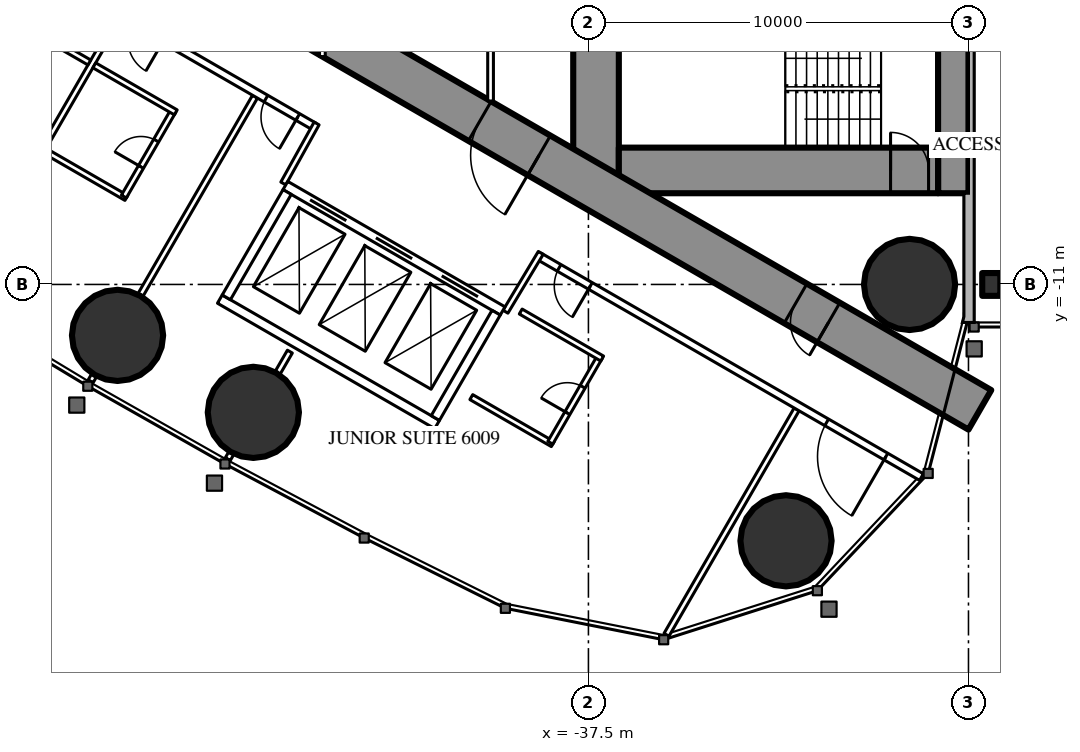
"""IFC4 building model, lengths in metres.
Left out: names, types, materials, properties, quantities, classifications, styles, units other than length and angle.
Written with IfcOpenShell. Run it as: python <this file> out.ifc"""

import sys

from ifc_helpers import new_model, si_unit, direction, frame, frame_2d, origin, origin_2d, place, context, subcontext, project, spatial, rectangle, circle, i_section, extrude, element, fill, save


model = new_model("IFC4")
c1 = context("Model", 3, precision=1e-05, world=origin(), true_north=direction((0.0, 1.0)))
c2 = subcontext(c1, "Body", "Model", "MODEL_VIEW")
j1 = project(units=[si_unit("LENGTHUNIT", "METRE"), si_unit("PLANEANGLEUNIT", "RADIAN")], contexts=[c1])
p1 = place(None, origin())
s1 = spatial("IfcSite", under=j1, at=p1, CompositionType="ELEMENT")
p2 = place(p1, origin())
s2 = spatial("IfcBuilding", under=s1, at=p2, CompositionType="ELEMENT")
p3 = place(p2, frame((0.0, 0.0, 226.1)))
s3 = spatial("IfcBuildingStorey", under=s2, at=p3, CompositionType="ELEMENT", Elevation=226.1)
for number, where, z_axis, x_axis in (
    (1, (-32.301, -17.745, 0.0), (0.0, 0.0, 1.0), (1.0, 0.0, 0.0)),
    (2, (-29.05, -11.0, 0.0), (0.0, 0.0, 1.0), (1.0, 0.0, 0.0)),
    (3, (-49.89, -12.34, 0.0), (0.0, 0.0, 1.0), (1.0, 0.0, 0.0)),
    (4, (-46.317, -14.365, 0.0), (0.0, 0.0, 1.0), (1.0, 0.0, 0.0)),
):
    element("IfcColumn", number, at=place(p3, frame(where, z_axis=z_axis, x_axis=x_axis)), inside=s3, PredefinedType="COLUMN", context=c2, shape_type="SweptSolid", body=[
        extrude(circle(Radius=1.2, at=origin_2d()), origin(), (0.0, 0.0, 1.0), 3.6),
    ])
p4 = place(p3, frame((-27.9, 8.6, 0.0), z_axis=(0.0, 0.0, 1.0), x_axis=(0.0, -1.0, 0.0)))
e5 = element("IfcWall", 5, at=p4, inside=s3, PredefinedType="SHEAR", context=c2, shape_type="SweptSolid", body=[
    extrude(rectangle(XDim=17.2, YDim=0.8, at=frame_2d((8.6, 0.0))), origin(), (0.0, 0.0, 1.0), 3.6),
])
p5 = place(p4, frame((6.95, 0.0, 0.0)))
e6 = element("IfcOpeningElement", 6, at=p5, cuts=e5, PredefinedType="OPENING", context=c2, shape_type="SweptSolid", body=[
    extrude(rectangle(XDim=0.9, YDim=2.2, at=frame_2d((0.45, 1.1))), frame((0.0, 0.41, 0.0), z_axis=(0.0, -1.0, 0.0), x_axis=(1.0, 0.0, 0.0)), (0.0, 0.0, 1.0), 0.82),
])
p6 = place(p3, frame((-37.3, 8.6, 0.0), z_axis=(0.0, 0.0, 1.0), x_axis=(0.0, -1.0, 0.0)))
e7 = element("IfcWall", 7, at=p6, inside=s3, PredefinedType="SHEAR", context=c2, shape_type="SweptSolid", body=[
    extrude(rectangle(XDim=17.2, YDim=1.2, at=frame_2d((8.6, 0.0))), origin(), (0.0, 0.0, 1.0), 3.6),
])
p7 = place(p6, frame((7.7, 0.0, 0.0)))
e8 = element("IfcOpeningElement", 8, at=p7, cuts=e7, PredefinedType="OPENING", context=c2, shape_type="SweptSolid", body=[
    extrude(rectangle(XDim=1.8, YDim=2.2, at=frame_2d((0.9, 1.1))), frame((0.0, 0.61, 0.0), z_axis=(0.0, -1.0, 0.0), x_axis=(1.0, 0.0, 0.0)), (0.0, 0.0, 1.0), 1.22),
])
p8 = place(p3, frame((-28.3, -8.0, 0.0), z_axis=(0.0, 0.0, 1.0), x_axis=(-1.0, 0.0, 0.0)))
e9 = element("IfcWall", 9, at=p8, inside=s3, PredefinedType="SHEAR", context=c2, shape_type="SweptSolid", body=[
    extrude(rectangle(XDim=8.4, YDim=1.2, at=frame_2d((4.2, 0.0))), origin(), (0.0, 0.0, 1.0), 3.6),
])
p9 = place(p8, frame((0.25, 0.0, 0.0)))
e10 = element("IfcOpeningElement", 10, at=p9, cuts=e9, PredefinedType="OPENING", context=c2, shape_type="SweptSolid", body=[
    extrude(rectangle(XDim=1.0, YDim=2.2, at=frame_2d((0.5, 1.1))), frame((0.0, 0.61, 0.0), z_axis=(0.0, -1.0, 0.0), x_axis=(1.0, 0.0, 0.0)), (0.0, 0.0, 1.0), 1.22),
])
p10 = place(p3, frame((-27.2, -14.3, 0.0), z_axis=(0.0, 0.0, 1.0), x_axis=(-0.866024021859, 0.500002393557, 0.0)))
e11 = element("IfcWall", 11, at=p10, inside=s3, PredefinedType="SHEAR", context=c2, shape_type="SweptSolid", body=[
    extrude(rectangle(XDim=27.907, YDim=1.2, at=frame_2d((13.954, 0.0))), origin(), (0.0, 0.0, 1.0), 3.6),
])
p11 = place(p10, frame((4.6, 0.0, 0.0)))
e12 = element("IfcOpeningElement", 12, at=p11, cuts=e11, PredefinedType="OPENING", context=c2, shape_type="SweptSolid", body=[
    extrude(rectangle(XDim=1.0, YDim=2.2, at=frame_2d((0.5, 1.1))), frame((0.0, 0.61, 0.0), z_axis=(0.0, -1.0, 0.0), x_axis=(1.0, 0.0, 0.0)), (0.0, 0.0, 1.0), 1.22),
])
p12 = place(p10, frame((13.395, 0.0, 0.0)))
e13 = element("IfcOpeningElement", 13, at=p12, cuts=e11, PredefinedType="OPENING", context=c2, shape_type="SweptSolid", body=[
    extrude(rectangle(XDim=1.8, YDim=2.2, at=frame_2d((0.9, 1.1))), frame((0.0, 0.61, 0.0), z_axis=(0.0, -1.0, 0.0), x_axis=(1.0, 0.0, 0.0)), (0.0, 0.0, 1.0), 1.22),
])
p13 = place(p3, frame((-26.9, -11.0, 0.0), z_axis=(0.0, 0.0, 1.0), x_axis=(1.0, 0.0, 0.0)))
e14 = element("IfcColumn", 14, at=p13, inside=s3, PredefinedType="COLUMN", context=c2, shape_type="SweptSolid", body=[
    extrude(i_section(OverallWidth=0.476, OverallDepth=0.6, WebThickness=0.1, FlangeThickness=0.14, FilletRadius=0.02, at=origin_2d()), origin(), (0.0, 0.0, 1.0), 3.6),
])
p14 = place(p3, frame((-32.022, -14.287, 0.0), z_axis=(0.0, 0.0, 1.0), x_axis=(-0.50000019414, -0.866025291697, 0.0)))
e15 = element("IfcWall", 15, at=p14, inside=s3, PredefinedType="PARTITIONING", context=c2, shape_type="SweptSolid", body=[
    extrude(rectangle(XDim=6.848, YDim=0.15, at=frame_2d((3.424, 0.0))), origin(), (0.0, 0.0, 1.0), 3.35),
])
p15 = place(p3, frame((-46.898, -15.439, 0.0), z_axis=(0.0, 0.0, 1.0), x_axis=(-0.500232303069, -0.865891241997, 0.0)))
e16 = element("IfcWall", 16, at=p15, inside=s3, PredefinedType="PARTITIONING", context=c2, shape_type="SweptSolid", body=[
    extrude(rectangle(XDim=0.18, YDim=0.15, at=frame_2d((0.09, 0.0))), origin(), (0.0, 0.0, 1.0), 2.45),
])
p16 = place(p3, frame((-46.274, -6.059, 0.0), z_axis=(0.0, 0.0, 1.0), x_axis=(-0.500020471368, -0.866013584312, 0.0)))
e17 = element("IfcWall", 17, at=p16, inside=s3, PredefinedType="PARTITIONING", context=c2, shape_type="SweptSolid", body=[
    extrude(rectangle(XDim=6.028, YDim=0.15, at=frame_2d((3.014, 0.0))), origin(), (0.0, 0.0, 1.0), 2.45),
])
p17 = place(p3, frame((-50.508, -13.392, 0.0), z_axis=(0.0, 0.0, 1.0), x_axis=(-0.499644091975, -0.866230789891, 0.0)))
e18 = element("IfcWall", 18, at=p17, inside=s3, PredefinedType="PARTITIONING", context=c2, shape_type="SweptSolid", body=[
    extrude(rectangle(XDim=0.18, YDim=0.15, at=frame_2d((0.09, 0.0))), origin(), (0.0, 0.0, 1.0), 2.45),
])
p18 = place(p3, frame((-49.866, -3.985, 0.0), z_axis=(0.0, 0.0, 1.0), x_axis=(-0.500000694566, -0.866025002776, 0.0)))
e19 = element("IfcWall", 19, at=p18, inside=s3, PredefinedType="PARTITIONING", context=c2, shape_type="SweptSolid", body=[
    extrude(rectangle(XDim=5.95, YDim=0.15, at=frame_2d((2.975, 0.0))), origin(), (0.0, 0.0, 1.0), 2.45),
])
p19 = place(p3, frame((-45.356, -12.767, 0.0), z_axis=(0.0, 0.0, 1.0), x_axis=(-0.499886366516, -0.866091000168, 0.0)))
e20 = element("IfcWall", 20, at=p19, inside=s3, PredefinedType="PARTITIONING", context=c2, shape_type="SweptSolid", body=[
    extrude(rectangle(XDim=0.645, YDim=0.15, at=frame_2d((0.322, 0.0))), origin(), (0.0, 0.0, 1.0), 3.35),
])
p20 = place(p3, frame((-28.737, -16.068, 0.0), z_axis=(0.0, 0.0, 1.0), x_axis=(-0.866029399323, 0.49999307946, 0.0)))
e21 = element("IfcWall", 21, at=p20, inside=s3, PredefinedType="PARTITIONING", context=c2, shape_type="SweptSolid", body=[
    extrude(rectangle(XDim=11.61, YDim=0.2, at=frame_2d((5.805, 0.0))), origin(), (0.0, 0.0, 1.0), 3.35),
])
p21 = place(p20, frame((1.08, 0.0, 0.0)))
e22 = element("IfcOpeningElement", 22, at=p21, cuts=e21, PredefinedType="OPENING", context=c2, shape_type="SweptSolid", body=[
    extrude(rectangle(XDim=1.8, YDim=2.04, at=frame_2d((0.9, 1.02))), frame((0.0, 0.11, 0.0), z_axis=(0.0, -1.0, 0.0), x_axis=(1.0, 0.0, 0.0)), (0.0, 0.0, 1.0), 0.22),
])
p22 = place(p20, frame((10.06, 0.0, 0.0)))
e23 = element("IfcOpeningElement", 23, at=p22, cuts=e21, PredefinedType="OPENING", context=c2, shape_type="SweptSolid", body=[
    extrude(rectangle(XDim=0.95, YDim=2.2, at=frame_2d((0.475, 1.1))), frame((0.0, 0.11, 0.0), z_axis=(0.0, -1.0, 0.0), x_axis=(1.0, 0.0, 0.0)), (0.0, 0.0, 1.0), 0.22),
])
p23 = place(p3, frame((-44.715, -6.844, 0.0), z_axis=(0.0, 0.0, 1.0), x_axis=(-0.866025261224, 0.500000246922, 0.0)))
e24 = element("IfcWall", 24, at=p23, inside=s3, PredefinedType="PARTITIONING", context=c2, shape_type="SweptSolid", body=[
    extrude(rectangle(XDim=13.567, YDim=0.2, at=frame_2d((6.783, 0.0))), origin(), (0.0, 0.0, 1.0), 3.35),
])
p24 = place(p23, frame((6.266, 0.0, 0.0)))
e25 = element("IfcOpeningElement", 25, at=p24, cuts=e24, PredefinedType="OPENING", context=c2, shape_type="SweptSolid", body=[
    extrude(rectangle(XDim=0.95, YDim=2.2, at=frame_2d((0.475, 1.1))), frame((0.0, 0.11, 0.0), z_axis=(0.0, -1.0, 0.0), x_axis=(1.0, 0.0, 0.0)), (0.0, 0.0, 1.0), 0.22),
])
p25 = place(p23, frame((4.565, 0.0, 0.0)))
e26 = element("IfcOpeningElement", 26, at=p25, cuts=e24, PredefinedType="OPENING", context=c2, shape_type="SweptSolid", body=[
    extrude(rectangle(XDim=0.95, YDim=2.2, at=frame_2d((0.475, 1.1))), frame((0.0, 0.11, 0.0), z_axis=(0.0, -1.0, 0.0), x_axis=(1.0, 0.0, 0.0)), (0.0, 0.0, 1.0), 0.22),
])
p26 = place(p23, frame((0.5, 0.0, 0.0)))
e27 = element("IfcOpeningElement", 27, at=p26, cuts=e24, PredefinedType="OPENING", context=c2, shape_type="SweptSolid", body=[
    extrude(rectangle(XDim=0.967, YDim=2.2, at=frame_2d((0.483, 1.1))), frame((0.0, 0.11, 0.0), z_axis=(0.0, -1.0, 0.0), x_axis=(1.0, 0.0, 0.0)), (0.0, 0.0, 1.0), 0.22),
])
for number, where, z_axis, x_axis in (
    (28, (-39.683, -11.718, 0.0), (0.0, 0.0, 1.0), (0.514, 0.858, 0.0)),
    (29, (-44.652, -6.764, 0.0), (0.0, 0.0, 1.0), (-0.485, -0.874, 0.0)),
):
    element("IfcWall", number, at=place(p3, frame(where, z_axis=z_axis, x_axis=x_axis)), inside=s3, PredefinedType="PARTITIONING", context=c2, shape_type="SweptSolid", body=[
        extrude(rectangle(XDim=1.805, YDim=0.15, at=frame_2d((0.903, 0.0))), origin(), (0.0, 0.0, 1.0), 3.35),
    ])
p27 = place(p3, frame((-50.631, -5.16, 0.0), z_axis=(0.0, 0.0, 1.0), x_axis=(-0.86604923931, 0.499958713387, 0.0)))
e30 = element("IfcWall", 30, at=p27, inside=s3, PredefinedType="PARTITIONING", context=c2, shape_type="SweptSolid", body=[
    extrude(rectangle(XDim=2.475, YDim=0.15, at=frame_2d((1.237, 0.0))), origin(), (0.0, 0.0, 1.0), 2.5),
])
p28 = place(p3, frame((-49.658, -8.724, 0.0), z_axis=(0.0, 0.0, 1.0), x_axis=(-0.866031185235, 0.4999899861, 0.0)))
e31 = element("IfcWall", 31, at=p28, inside=s3, PredefinedType="PARTITIONING", context=c2, shape_type="SweptSolid", body=[
    extrude(rectangle(XDim=2.475, YDim=0.15, at=frame_2d((1.238, 0.0))), origin(), (0.0, 0.0, 1.0), 3.35),
])
p29 = place(p3, frame((-48.423, -6.435, 0.0), z_axis=(0.0, 0.0, 1.0), x_axis=(-0.500006934395, -0.866021400173, 0.0)))
e32 = element("IfcWall", 32, at=p29, inside=s3, PredefinedType="PARTITIONING", context=c2, shape_type="SweptSolid", body=[
    extrude(rectangle(XDim=2.6, YDim=0.15, at=frame_2d((1.3, 0.0))), origin(), (0.0, 0.0, 1.0), 3.35),
])
p30 = place(p29, frame((0.9, 0.0, 0.0)))
e33 = element("IfcOpeningElement", 33, at=p30, cuts=e32, PredefinedType="OPENING", context=c2, shape_type="SweptSolid", body=[
    extrude(rectangle(XDim=0.8, YDim=2.2, at=frame_2d((0.4, 1.1))), frame((0.0, 0.085, 0.0), z_axis=(0.0, -1.0, 0.0), x_axis=(1.0, 0.0, 0.0)), (0.0, 0.0, 1.0), 0.17),
])
p31 = place(p3, frame((-48.358, -6.472, 0.0), z_axis=(0.0, 0.0, 1.0), x_axis=(-0.866073894602, 0.499916002032, 0.0)))
e34 = element("IfcWall", 34, at=p31, inside=s3, PredefinedType="PARTITIONING", context=c2, shape_type="SweptSolid", body=[
    extrude(rectangle(XDim=2.475, YDim=0.15, at=frame_2d((1.238, 0.0))), origin(), (0.0, 0.0, 1.0), 2.5),
])
p32 = place(p3, frame((-38.438, -15.202, 0.0), z_axis=(0.0, 0.0, 1.0), x_axis=(-0.866073894602, 0.499916002032, 0.0)))
e35 = element("IfcWall", 35, at=p32, inside=s3, PredefinedType="PARTITIONING", context=c2, shape_type="SweptSolid", body=[
    extrude(rectangle(XDim=2.475, YDim=0.15, at=frame_2d((1.238, 0.0))), origin(), (0.0, 0.0, 1.0), 3.35),
])
p33 = place(p3, frame((-37.203, -12.913, 0.0), z_axis=(0.0, 0.0, 1.0), x_axis=(-0.500006934395, -0.866021400173, 0.0)))
e36 = element("IfcWall", 36, at=p33, inside=s3, PredefinedType="PARTITIONING", context=c2, shape_type="SweptSolid", body=[
    extrude(rectangle(XDim=2.6, YDim=0.15, at=frame_2d((1.3, 0.0))), origin(), (0.0, 0.0, 1.0), 3.35),
])
p34 = place(p33, frame((0.9, 0.0, 0.0)))
e37 = element("IfcOpeningElement", 37, at=p34, cuts=e36, PredefinedType="OPENING", context=c2, shape_type="SweptSolid", body=[
    extrude(rectangle(XDim=0.8, YDim=2.2, at=frame_2d((0.4, 1.1))), frame((0.0, 0.085, 0.0), z_axis=(0.0, -1.0, 0.0), x_axis=(1.0, 0.0, 0.0)), (0.0, 0.0, 1.0), 0.17),
])
p35 = place(p3, frame((-37.138, -12.95, 0.0), z_axis=(0.0, 0.0, 1.0), x_axis=(-0.866031185235, 0.4999899861, 0.0)))
e38 = element("IfcWall", 38, at=p35, inside=s3, PredefinedType="PARTITIONING", context=c2, shape_type="SweptSolid", body=[
    extrude(rectangle(XDim=2.475, YDim=0.15, at=frame_2d((1.238, 0.0))), origin(), (0.0, 0.0, 1.0), 2.5),
])
p36 = place(p3, frame((-40.075, 6.174, 0.0), z_axis=(0.0, 0.0, 1.0), x_axis=(0.0, -1.0, 0.0)))
e39 = element("IfcWall", 39, at=p36, inside=s3, PredefinedType="PARTITIONING", context=c2, shape_type="SweptSolid", body=[
    extrude(rectangle(XDim=12.348, YDim=0.15, at=frame_2d((6.174, 0.0))), origin(), (0.0, 0.0, 1.0), 3.35),
])
p37 = place(p36, frame((5.274, 0.0, 0.0)))
e40 = element("IfcOpeningElement", 40, at=p37, cuts=e39, PredefinedType="OPENING", context=c2, shape_type="SweptSolid", body=[
    extrude(rectangle(XDim=1.8, YDim=2.2, at=frame_2d((0.9, 1.1))), frame((0.0, 0.085, 0.0), z_axis=(0.0, -1.0, 0.0), x_axis=(1.0, 0.0, 0.0)), (0.0, 0.0, 1.0), 0.17),
])
p38 = place(p3, frame((-44.5, 5.005, 0.0), z_axis=(0.0, 0.0, 1.0), x_axis=(0.0, -1.0, 0.0)))
e41 = element("IfcWall", 41, at=p38, inside=s3, PredefinedType="PARTITIONING", context=c2, shape_type="SweptSolid", body=[
    extrude(rectangle(XDim=10.009, YDim=0.15, at=frame_2d((5.005, 0.0))), origin(), (0.0, 0.0, 1.0), 2.5),
])
p39 = place(p38, frame((4.505, 0.0, 0.0)))
e42 = element("IfcOpeningElement", 42, at=p39, cuts=e41, PredefinedType="OPENING", context=c2, shape_type="SweptSolid", body=[
    extrude(rectangle(XDim=1.0, YDim=2.2, at=frame_2d((0.5, 1.1))), frame((0.0, 0.085, 0.0), z_axis=(0.0, -1.0, 0.0), x_axis=(1.0, 0.0, 0.0)), (0.0, 0.0, 1.0), 0.17),
])
p40 = place(p3, frame((-39.758, -11.697, 0.0), z_axis=(0.0, 0.0, 1.0), x_axis=(-0.866024194504, 0.500002094529, 0.0)))
e43 = element("IfcWall", 43, at=p40, inside=s3, PredefinedType="PARTITIONING", context=c2, shape_type="SweptSolid", body=[
    extrude(rectangle(XDim=6.6, YDim=0.25, at=frame_2d((3.3, 0.0))), origin(), (0.0, 0.0, 1.0), 3.35),
])
p41 = place(p40, frame((0.75, 0.0, 0.0)))
e44 = element("IfcOpeningElement", 44, at=p41, cuts=e43, PredefinedType="OPENING", context=c2, shape_type="SweptSolid", body=[
    extrude(rectangle(XDim=1.1, YDim=2.2, at=frame_2d((0.55, 1.1))), frame((0.0, 0.135, 0.0), z_axis=(0.0, -1.0, 0.0), x_axis=(1.0, 0.0, 0.0)), (0.0, 0.0, 1.0), 0.27),
])
p42 = place(p40, frame((2.75, 0.0, 0.0)))
e45 = element("IfcOpeningElement", 45, at=p42, cuts=e43, PredefinedType="OPENING", context=c2, shape_type="SweptSolid", body=[
    extrude(rectangle(XDim=1.1, YDim=2.2, at=frame_2d((0.55, 1.1))), frame((0.0, 0.135, 0.0), z_axis=(0.0, -1.0, 0.0), x_axis=(1.0, 0.0, 0.0)), (0.0, 0.0, 1.0), 0.27),
])
p43 = place(p40, frame((4.75, 0.0, 0.0)))
e46 = element("IfcOpeningElement", 46, at=p43, cuts=e43, PredefinedType="OPENING", context=c2, shape_type="SweptSolid", body=[
    extrude(rectangle(XDim=1.1, YDim=2.2, at=frame_2d((0.55, 1.1))), frame((0.0, 0.135, 0.0), z_axis=(0.0, -1.0, 0.0), x_axis=(1.0, 0.0, 0.0)), (0.0, 0.0, 1.0), 0.27),
])
p44 = place(p3, frame((-41.482, -14.686, 0.0), z_axis=(0.0, 0.0, 1.0), x_axis=(-0.86603344179, 0.499986077507, 0.0)))
e47 = element("IfcWall", 47, at=p44, inside=s3, PredefinedType="PARTITIONING", context=c2, shape_type="SweptSolid", body=[
    extrude(rectangle(XDim=6.6, YDim=0.25, at=frame_2d((3.3, 0.0))), origin(), (0.0, 0.0, 1.0), 3.35),
])
for number, where, z_axis, x_axis in (
    (48, (-39.928, -11.743, 0.0), (0.0, 0.0, 1.0), (-0.5, -0.866, 0.0)),
    (49, (-45.428, -8.568, 0.0), (0.0, 0.0, 1.0), (-0.5, -0.866, 0.0)),
):
    element("IfcWall", number, at=place(p3, frame(where, z_axis=z_axis, x_axis=x_axis)), inside=s3, PredefinedType="PARTITIONING", context=c2, shape_type="SweptSolid", body=[
        extrude(rectangle(XDim=3.201, YDim=0.25, at=frame_2d((1.6, 0.0))), origin(), (0.0, 0.0, 1.0), 3.35),
    ])
p45 = place(p30, origin())
e50 = element("IfcDoor", 50, at=p45, inside=s3, OperationType="SINGLE_SWING_RIGHT", PredefinedType="DOOR", context=c2, shape_type="SweptSolid", body=[
    extrude(rectangle(XDim=0.8, YDim=2.2, at=frame_2d((0.4, 1.1))), frame((0.0, 0.025, 0.0), z_axis=(0.0, -1.0, 0.0), x_axis=(1.0, 0.0, 0.0)), (0.0, 0.0, 1.0), 0.05),
])
fill(e33, e50)
p46 = place(p21, origin())
e51 = element("IfcDoor", 51, at=p46, inside=s3, OperationType="DOUBLE_DOOR_SINGLE_SWING", PredefinedType="DOOR", context=c2, shape_type="SweptSolid", body=[
    extrude(rectangle(XDim=1.8, YDim=2.04, at=frame_2d((0.9, 1.02))), frame((0.0, 0.025, 0.0), z_axis=(0.0, -1.0, 0.0), x_axis=(1.0, 0.0, 0.0)), (0.0, 0.0, 1.0), 0.05),
])
fill(e22, e51)
p47 = place(p34, origin())
e52 = element("IfcDoor", 52, at=p47, inside=s3, OperationType="SINGLE_SWING_RIGHT", PredefinedType="DOOR", context=c2, shape_type="SweptSolid", body=[
    extrude(rectangle(XDim=0.8, YDim=2.2, at=frame_2d((0.4, 1.1))), frame((0.0, 0.025, 0.0), z_axis=(0.0, -1.0, 0.0), x_axis=(1.0, 0.0, 0.0)), (0.0, 0.0, 1.0), 0.05),
])
fill(e37, e52)
p48 = place(p22, origin())
e53 = element("IfcDoor", 53, at=p48, inside=s3, OperationType="SINGLE_SWING_LEFT", PredefinedType="DOOR", context=c2, shape_type="SweptSolid", body=[
    extrude(rectangle(XDim=0.95, YDim=2.2, at=frame_2d((0.475, 1.1))), frame((0.0, 0.025, 0.0), z_axis=(0.0, -1.0, 0.0), x_axis=(1.0, 0.0, 0.0)), (0.0, 0.0, 1.0), 0.05),
])
fill(e23, e53)
p49 = place(p26, origin())
e54 = element("IfcDoor", 54, at=p49, inside=s3, OperationType="SINGLE_SWING_LEFT", PredefinedType="DOOR", context=c2, shape_type="SweptSolid", body=[
    extrude(rectangle(XDim=0.967, YDim=2.2, at=frame_2d((0.483, 1.1))), frame((0.0, 0.025, 0.0), z_axis=(0.0, -1.0, 0.0), x_axis=(1.0, 0.0, 0.0)), (0.0, 0.0, 1.0), 0.05),
])
fill(e27, e54)
p50 = place(p11, origin())
e55 = element("IfcDoor", 55, at=p50, inside=s3, OperationType="SINGLE_SWING_LEFT", PredefinedType="DOOR", context=c2, shape_type="SweptSolid", body=[
    extrude(rectangle(XDim=1.0, YDim=2.2, at=frame_2d((0.5, 1.1))), frame((0.0, 0.025, 0.0), z_axis=(0.0, -1.0, 0.0), x_axis=(1.0, 0.0, 0.0)), (0.0, 0.0, 1.0), 0.05),
])
fill(e12, e55)
p51 = place(p12, origin())
e56 = element("IfcDoor", 56, at=p51, inside=s3, OperationType="DOUBLE_DOOR_SINGLE_SWING", PredefinedType="DOOR", context=c2, shape_type="SweptSolid", body=[
    extrude(rectangle(XDim=1.8, YDim=2.2, at=frame_2d((0.9, 1.1))), frame((0.0, 0.025, 0.0), z_axis=(0.0, -1.0, 0.0), x_axis=(1.0, 0.0, 0.0)), (0.0, 0.0, 1.0), 0.05),
])
fill(e13, e56)
p52 = place(p9, origin())
e57 = element("IfcDoor", 57, at=p52, inside=s3, OperationType="SINGLE_SWING_RIGHT", PredefinedType="DOOR", context=c2, shape_type="SweptSolid", body=[
    extrude(rectangle(XDim=1.0, YDim=2.2, at=frame_2d((0.5, 1.1))), frame((0.0, 0.025, 0.0), z_axis=(0.0, -1.0, 0.0), x_axis=(1.0, 0.0, 0.0)), (0.0, 0.0, 1.0), 0.05),
])
fill(e10, e57)
p53 = place(p41, origin())
e58 = element("IfcDoor", 58, at=p53, inside=s3, OperationType="DOUBLE_DOOR_SLIDING", PredefinedType="USERDEFINED", context=c2, shape_type="SweptSolid", body=[
    extrude(rectangle(XDim=1.1, YDim=2.2, at=frame_2d((0.55, 1.1))), frame((0.0, 0.025, 0.0), z_axis=(0.0, -1.0, 0.0), x_axis=(1.0, 0.0, 0.0)), (0.0, 0.0, 1.0), 0.05),
])
fill(e44, e58)
p54 = place(p42, origin())
e59 = element("IfcDoor", 59, at=p54, inside=s3, OperationType="DOUBLE_DOOR_SLIDING", PredefinedType="USERDEFINED", context=c2, shape_type="SweptSolid", body=[
    extrude(rectangle(XDim=1.1, YDim=2.2, at=frame_2d((0.55, 1.1))), frame((0.0, 0.025, 0.0), z_axis=(0.0, -1.0, 0.0), x_axis=(1.0, 0.0, 0.0)), (0.0, 0.0, 1.0), 0.05),
])
fill(e45, e59)
p55 = place(p43, origin())
e60 = element("IfcDoor", 60, at=p55, inside=s3, OperationType="DOUBLE_DOOR_SLIDING", PredefinedType="USERDEFINED", context=c2, shape_type="SweptSolid", body=[
    extrude(rectangle(XDim=1.1, YDim=2.2, at=frame_2d((0.55, 1.1))), frame((0.0, 0.025, 0.0), z_axis=(0.0, -1.0, 0.0), x_axis=(1.0, 0.0, 0.0)), (0.0, 0.0, 1.0), 0.05),
])
fill(e46, e60)
save(model, sys.argv[1])
